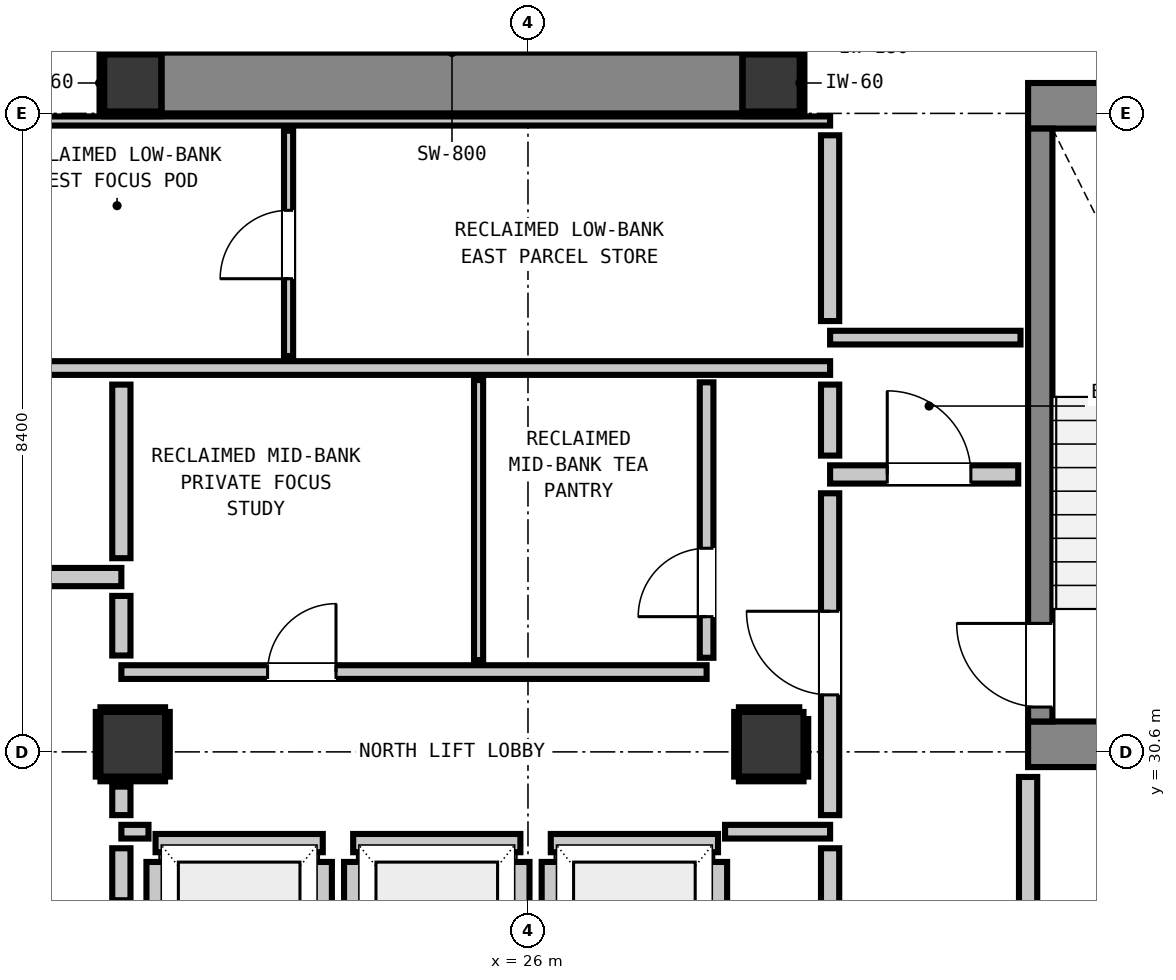
"""IFC4 building model, lengths in metres.
Left out: names, types, materials, properties, quantities, classifications, styles, units other than length and angle.
Written with IfcOpenShell. Run it as: python <this file> out.ifc"""

import sys

from ifc_helpers import new_model, si_unit, direction, frame, frame_2d, origin, origin_2d, place, context, subcontext, project, spatial, rectangle, extrude, element, fill, save


model = new_model("IFC4")
c1 = context("Model", 3, precision=1e-05, world=origin(), true_north=direction((0.0, 1.0)))
c2 = subcontext(c1, "Body", "Model", "MODEL_VIEW")
j1 = project(units=[si_unit("LENGTHUNIT", "METRE"), si_unit("PLANEANGLEUNIT", "RADIAN")], contexts=[c1])
p1 = place(None, origin())
s1 = spatial("IfcSite", under=j1, at=p1, CompositionType="ELEMENT")
p2 = place(p1, origin())
s2 = spatial("IfcBuilding", under=s1, at=p2, CompositionType="ELEMENT")
p3 = place(p2, frame((0.0, 0.0, 237.92)))
s3 = spatial("IfcBuildingStorey", under=s2, at=p3, CompositionType="ELEMENT", Elevation=237.92)
for number, where, z_axis, x_axis in (
    (1, (20.8, 39.4, 0.0), (0.0, 0.0, 1.0), (1.0, 0.0, 0.0)),
    (2, (29.2, 39.4, 0.0), (0.0, 0.0, 1.0), (1.0, 0.0, 0.0)),
):
    element("IfcColumn", number, at=place(p3, frame(where, z_axis=z_axis, x_axis=x_axis)), inside=s3, PredefinedType="COLUMN", context=c2, shape_type="SweptSolid", body=[
        extrude(rectangle(XDim=0.75, YDim=0.75, at=origin_2d()), origin(), (0.0, 0.0, 1.0), 3.32),
    ])
p4 = place(p3, frame((32.58, 39.1, 0.0), z_axis=(0.0, 0.0, 1.0), x_axis=(1.0, 0.0, 0.0)))
e3 = element("IfcWall", 3, at=p4, inside=s3, PredefinedType="SHEAR", context=c2, shape_type="SweptSolid", body=[
    extrude(rectangle(XDim=4.08, YDim=0.6, at=frame_2d((2.04, 0.0))), origin(), (0.0, 0.0, 1.0), 3.32),
])
p5 = place(p3, frame((32.58, 30.7, 0.0), z_axis=(0.0, 0.0, 1.0), x_axis=(1.0, 0.0, 0.0)))
e4 = element("IfcWall", 4, at=p5, inside=s3, PredefinedType="SHEAR", context=c2, shape_type="SweptSolid", body=[
    extrude(rectangle(XDim=3.54, YDim=0.6, at=frame_2d((1.77, 0.0))), origin(), (0.0, 0.0, 1.0), 3.32),
])
p6 = place(p3, frame((21.18, 39.4, 0.0), z_axis=(0.0, 0.0, 1.0), x_axis=(1.0, 0.0, 0.0)))
e5 = element("IfcWall", 5, at=p6, inside=s3, PredefinedType="SHEAR", context=c2, shape_type="SweptSolid", body=[
    extrude(rectangle(XDim=7.64, YDim=0.8, at=frame_2d((3.82, 0.0))), origin(), (0.0, 0.0, 1.0), 3.32),
])
p7 = place(p3, frame((32.74, 31.0, 0.0), z_axis=(0.0, 0.0, 1.0), x_axis=(0.0, 1.0, 0.0)))
e6 = element("IfcWall", 6, at=p7, inside=s3, PredefinedType="SHEAR", context=c2, shape_type="SweptSolid", body=[
    extrude(rectangle(XDim=7.8, YDim=0.32, at=frame_2d((3.9, 0.0))), origin(), (0.0, 0.0, 1.0), 3.32),
])
p8 = place(p7, frame((0.19, 0.0, 0.0)))
e7 = element("IfcOpeningElement", 7, at=p8, cuts=e6, PredefinedType="OPENING", context=c2, shape_type="SweptSolid", body=[
    extrude(rectangle(XDim=1.1, YDim=2.15, at=frame_2d((0.55, 1.075))), frame((0.0, 0.17, 0.0), z_axis=(0.0, -1.0, 0.0), x_axis=(1.0, 0.0, 0.0)), (0.0, 0.0, 1.0), 0.34),
])
for number, where, z_axis, x_axis in (
    (8, (20.8, 30.7, 0.0), (0.0, 0.0, 1.0), (1.0, 0.0, 0.0)),
    (9, (29.2, 30.7, 0.0), (0.0, 0.0, 1.0), (1.0, 0.0, 0.0)),
):
    element("IfcColumn", number, at=place(p3, frame(where, z_axis=z_axis, x_axis=x_axis)), inside=s3, PredefinedType="COLUMN", context=c2, shape_type="SweptSolid", body=[
        extrude(rectangle(XDim=0.85, YDim=0.85, at=origin_2d()), origin(), (0.0, 0.0, 1.0), 3.32),
    ])
p9 = place(p3, frame((21.1, 29.4, 0.0), z_axis=(0.0, 0.0, 1.0), x_axis=(1.0, 0.0, 0.0)))
e10 = element("IfcWall", 10, at=p9, inside=s3, PredefinedType="PARTITIONING", context=c2, shape_type="SweptSolid", body=[
    extrude(rectangle(XDim=2.2, YDim=0.24, at=frame_2d((1.1, 0.0))), origin(), (0.0, 0.0, 1.0), 3.1),
])
p10 = place(p3, frame((21.1, 27.048, 0.0), z_axis=(0.0, 0.0, 1.0), x_axis=(0.0, 1.0, 0.0)))
e11 = element("IfcWall", 11, at=p10, inside=s3, PredefinedType="PARTITIONING", context=c2, shape_type="SweptSolid", body=[
    extrude(rectangle(XDim=2.104, YDim=0.24, at=frame_2d((1.052, 0.0))), origin(), (0.0, 0.0, 1.0), 2.335),
])
p11 = place(p3, frame((23.3, 27.048, 0.0), z_axis=(0.0, 0.0, 1.0), x_axis=(0.0, 1.0, 0.0)))
e12 = element("IfcWall", 12, at=p11, inside=s3, PredefinedType="PARTITIONING", context=c2, shape_type="SweptSolid", body=[
    extrude(rectangle(XDim=2.104, YDim=0.24, at=frame_2d((1.052, 0.0))), origin(), (0.0, 0.0, 1.0), 3.1),
])
p12 = place(p3, frame((23.7, 29.4, 0.0), z_axis=(0.0, 0.0, 1.0), x_axis=(1.0, 0.0, 0.0)))
e13 = element("IfcWall", 13, at=p12, inside=s3, PredefinedType="PARTITIONING", context=c2, shape_type="SweptSolid", body=[
    extrude(rectangle(XDim=2.2, YDim=0.24, at=frame_2d((1.1, 0.0))), origin(), (0.0, 0.0, 1.0), 3.1),
])
for number, where, z_axis, x_axis in (
    (14, (23.7, 27.048, 0.0), (0.0, 0.0, 1.0), (0.0, 1.0, 0.0)),
    (15, (25.9, 27.048, 0.0), (0.0, 0.0, 1.0), (0.0, 1.0, 0.0)),
):
    element("IfcWall", number, at=place(p3, frame(where, z_axis=z_axis, x_axis=x_axis)), inside=s3, PredefinedType="PARTITIONING", context=c2, shape_type="SweptSolid", body=[
        extrude(rectangle(XDim=2.104, YDim=0.24, at=frame_2d((1.052, 0.0))), origin(), (0.0, 0.0, 1.0), 3.1),
    ])
p13 = place(p3, frame((26.3, 29.4, 0.0), z_axis=(0.0, 0.0, 1.0), x_axis=(1.0, 0.0, 0.0)))
e16 = element("IfcWall", 16, at=p13, inside=s3, PredefinedType="PARTITIONING", context=c2, shape_type="SweptSolid", body=[
    extrude(rectangle(XDim=2.2, YDim=0.24, at=frame_2d((1.1, 0.0))), origin(), (0.0, 0.0, 1.0), 3.1),
])
p14 = place(p3, frame((26.3, 27.048, 0.0), z_axis=(0.0, 0.0, 1.0), x_axis=(0.0, 1.0, 0.0)))
e17 = element("IfcWall", 17, at=p14, inside=s3, PredefinedType="PARTITIONING", context=c2, shape_type="SweptSolid", body=[
    extrude(rectangle(XDim=2.104, YDim=0.24, at=frame_2d((1.052, 0.0))), origin(), (0.0, 0.0, 1.0), 3.1),
])
p15 = place(p3, frame((28.5, 27.33, 0.0), z_axis=(0.0, 0.0, 1.0), x_axis=(0.0, 1.0, 0.0)))
e18 = element("IfcWall", 18, at=p15, inside=s3, PredefinedType="PARTITIONING", context=c2, shape_type="SweptSolid", body=[
    extrude(rectangle(XDim=1.822, YDim=0.24, at=frame_2d((0.911, 0.0))), origin(), (0.0, 0.0, 1.0), 3.1),
])
p16 = place(p3, frame((17.45, 32.9, 0.0), z_axis=(0.0, 0.0, 1.0), x_axis=(1.0, 0.0, 0.0)))
e19 = element("IfcWall", 19, at=p16, inside=s3, PredefinedType="PARTITIONING", context=c2, shape_type="SweptSolid", body=[
    extrude(rectangle(XDim=3.2, YDim=0.24, at=frame_2d((1.6, 0.0))), origin(), (0.0, 0.0, 1.0), 3.1),
])
p17 = place(p16, frame((0.159, 0.0, 0.0)))
e20 = element("IfcOpeningElement", 20, at=p17, cuts=e19, PredefinedType="OPENING", context=c2, shape_type="SweptSolid", body=[
    extrude(rectangle(XDim=1.1, YDim=2.15, at=frame_2d((0.55, 1.075))), frame((0.0, 0.13, 0.0), z_axis=(0.0, -1.0, 0.0), x_axis=(1.0, 0.0, 0.0)), (0.0, 0.0, 1.0), 0.26),
])
p18 = place(p3, frame((29.975, 34.25, 0.0), z_axis=(0.0, 0.0, 1.0), x_axis=(1.0, 0.0, 0.0)))
e21 = element("IfcWall", 21, at=p18, inside=s3, PredefinedType="PARTITIONING", context=c2, shape_type="SweptSolid", body=[
    extrude(rectangle(XDim=2.475, YDim=0.24, at=frame_2d((1.237, 0.0))), origin(), (0.0, 0.0, 1.0), 3.1),
])
p19 = place(p18, frame((0.752, 0.0, 0.0)))
e22 = element("IfcOpeningElement", 22, at=p19, cuts=e21, PredefinedType="OPENING", context=c2, shape_type="SweptSolid", body=[
    extrude(rectangle(XDim=1.1, YDim=2.15, at=frame_2d((0.55, 1.075))), frame((0.0, 0.13, 0.0), z_axis=(0.0, -1.0, 0.0), x_axis=(1.0, 0.0, 0.0)), (0.0, 0.0, 1.0), 0.26),
])
p20 = place(p3, frame((20.65, 29.55, 0.0), z_axis=(0.0, 0.0, 1.0), x_axis=(1.0, 0.0, 0.0)))
e23 = element("IfcWall", 23, at=p20, inside=s3, PredefinedType="PARTITIONING", context=c2, shape_type="SweptSolid", body=[
    extrude(rectangle(XDim=0.357, YDim=0.18, at=frame_2d((0.179, 0.0))), origin(), (0.0, 0.0, 1.0), 3.1),
])
p21 = place(p3, frame((28.593, 29.55, 0.0), z_axis=(0.0, 0.0, 1.0), x_axis=(1.0, 0.0, 0.0)))
e24 = element("IfcWall", 24, at=p21, inside=s3, PredefinedType="PARTITIONING", context=c2, shape_type="SweptSolid", body=[
    extrude(rectangle(XDim=1.382, YDim=0.18, at=frame_2d((0.691, 0.0))), origin(), (0.0, 0.0, 1.0), 3.1),
])
p22 = place(p3, frame((20.65, 31.65, 0.0), z_axis=(0.0, 0.0, 1.0), x_axis=(1.0, 0.0, 0.0)))
e25 = element("IfcWall", 25, at=p22, inside=s3, PredefinedType="PARTITIONING", context=c2, shape_type="SweptSolid", body=[
    extrude(rectangle(XDim=7.7, YDim=0.18, at=frame_2d((3.85, 0.0))), origin(), (0.0, 0.0, 1.0), 3.1),
])
p23 = place(p22, frame((1.924, 0.0, 0.0)))
e26 = element("IfcOpeningElement", 26, at=p23, cuts=e25, PredefinedType="OPENING", context=c2, shape_type="SweptSolid", body=[
    extrude(rectangle(XDim=0.9, YDim=2.1, at=frame_2d((0.45, 1.05))), frame((0.0, 0.1, 0.0), z_axis=(0.0, -1.0, 0.0), x_axis=(1.0, 0.0, 0.0)), (0.0, 0.0, 1.0), 0.2),
])
p24 = place(p3, frame((18.95, 35.65, 0.0), z_axis=(0.0, 0.0, 1.0), x_axis=(1.0, 0.0, 0.0)))
e27 = element("IfcWall", 27, at=p24, inside=s3, PredefinedType="PARTITIONING", context=c2, shape_type="SweptSolid", body=[
    extrude(rectangle(XDim=11.025, YDim=0.18, at=frame_2d((5.513, 0.0))), origin(), (0.0, 0.0, 1.0), 3.1),
])
p25 = place(p3, frame((29.975, 36.05, 0.0), z_axis=(0.0, 0.0, 1.0), x_axis=(1.0, 0.0, 0.0)))
e28 = element("IfcWall", 28, at=p25, inside=s3, PredefinedType="PARTITIONING", context=c2, shape_type="SweptSolid", body=[
    extrude(rectangle(XDim=2.505, YDim=0.18, at=frame_2d((1.252, 0.0))), origin(), (0.0, 0.0, 1.0), 3.1),
])
p26 = place(p3, frame((18.95, 38.9, 0.0), z_axis=(0.0, 0.0, 1.0), x_axis=(1.0, 0.0, 0.0)))
e29 = element("IfcWall", 29, at=p26, inside=s3, PredefinedType="PARTITIONING", context=c2, shape_type="SweptSolid", body=[
    extrude(rectangle(XDim=11.025, YDim=0.12, at=frame_2d((5.513, 0.0))), origin(), (0.0, 0.0, 1.0), 3.1),
])
p27 = place(p3, frame((20.65, 28.648, 0.0), z_axis=(0.0, 0.0, 1.0), x_axis=(0.0, 1.0, 0.0)))
e30 = element("IfcWall", 30, at=p27, inside=s3, PredefinedType="PARTITIONING", context=c2, shape_type="SweptSolid", body=[
    extrude(rectangle(XDim=0.684, YDim=0.24, at=frame_2d((0.342, 0.0))), origin(), (0.0, 0.0, 1.0), 2.335),
])
p28 = place(p3, frame((20.65, 29.768, 0.0), z_axis=(0.0, 0.0, 1.0), x_axis=(0.0, 1.0, 0.0)))
e31 = element("IfcWall", 31, at=p28, inside=s3, PredefinedType="PARTITIONING", context=c2, shape_type="SweptSolid", body=[
    extrude(rectangle(XDim=0.375, YDim=0.24, at=frame_2d((0.188, 0.0))), origin(), (0.0, 0.0, 1.0), 2.335),
])
p29 = place(p3, frame((20.65, 31.868, 0.0), z_axis=(0.0, 0.0, 1.0), x_axis=(0.0, 1.0, 0.0)))
e32 = element("IfcWall", 32, at=p29, inside=s3, PredefinedType="PARTITIONING", context=c2, shape_type="SweptSolid", body=[
    extrude(rectangle(XDim=0.784, YDim=0.24, at=frame_2d((0.392, 0.0))), origin(), (0.0, 0.0, 1.0), 2.335),
])
p30 = place(p3, frame((20.65, 33.148, 0.0), z_axis=(0.0, 0.0, 1.0), x_axis=(0.0, 1.0, 0.0)))
e33 = element("IfcWall", 33, at=p30, inside=s3, PredefinedType="PARTITIONING", context=c2, shape_type="SweptSolid", body=[
    extrude(rectangle(XDim=2.284, YDim=0.24, at=frame_2d((1.142, 0.0))), origin(), (0.0, 0.0, 1.0), 2.335),
])
p31 = place(p3, frame((29.975, 25.648, 0.0), z_axis=(0.0, 0.0, 1.0), x_axis=(0.0, 1.0, 0.0)))
e34 = element("IfcWall", 34, at=p31, inside=s3, PredefinedType="PARTITIONING", context=c2, shape_type="SweptSolid", body=[
    extrude(rectangle(XDim=3.684, YDim=0.24, at=frame_2d((1.842, 0.0))), origin(), (0.0, 0.0, 1.0), 3.1),
])
p32 = place(p3, frame((29.975, 29.768, 0.0), z_axis=(0.0, 0.0, 1.0), x_axis=(0.0, 1.0, 0.0)))
e35 = element("IfcWall", 35, at=p32, inside=s3, PredefinedType="PARTITIONING", context=c2, shape_type="SweptSolid", body=[
    extrude(rectangle(XDim=4.234, YDim=0.24, at=frame_2d((2.117, 0.0))), origin(), (0.0, 0.0, 1.0), 3.1),
])
p33 = place(p32, frame((1.582, 0.0, 0.0)))
e36 = element("IfcOpeningElement", 36, at=p33, cuts=e35, PredefinedType="OPENING", context=c2, shape_type="SweptSolid", body=[
    extrude(rectangle(XDim=1.1, YDim=2.15, at=frame_2d((0.55, 1.075))), frame((0.0, 0.13, 0.0), z_axis=(0.0, -1.0, 0.0), x_axis=(1.0, 0.0, 0.0)), (0.0, 0.0, 1.0), 0.26),
])
p34 = place(p3, frame((29.975, 34.498, 0.0), z_axis=(0.0, 0.0, 1.0), x_axis=(0.0, 1.0, 0.0)))
e37 = element("IfcWall", 37, at=p34, inside=s3, PredefinedType="PARTITIONING", context=c2, shape_type="SweptSolid", body=[
    extrude(rectangle(XDim=0.934, YDim=0.24, at=frame_2d((0.467, 0.0))), origin(), (0.0, 0.0, 1.0), 3.1),
])
p35 = place(p3, frame((29.975, 36.268, 0.0), z_axis=(0.0, 0.0, 1.0), x_axis=(0.0, 1.0, 0.0)))
e38 = element("IfcWall", 38, at=p35, inside=s3, PredefinedType="PARTITIONING", context=c2, shape_type="SweptSolid", body=[
    extrude(rectangle(XDim=2.444, YDim=0.24, at=frame_2d((1.222, 0.0))), origin(), (0.0, 0.0, 1.0), 3.1),
])
p36 = place(p3, frame((32.58, 25.648, 0.0), z_axis=(0.0, 0.0, 1.0), x_axis=(0.0, 1.0, 0.0)))
e39 = element("IfcWall", 39, at=p36, inside=s3, PredefinedType="PARTITIONING", context=c2, shape_type="SweptSolid", body=[
    extrude(rectangle(XDim=4.622, YDim=0.24, at=frame_2d((2.311, 0.0))), origin(), (0.0, 0.0, 1.0), 3.1),
])
p37 = place(p3, frame((28.35, 31.838, 0.0), z_axis=(0.0, 0.0, 1.0), x_axis=(0.0, 1.0, 0.0)))
e40 = element("IfcWall", 40, at=p37, inside=s3, PredefinedType="PARTITIONING", context=c2, shape_type="SweptSolid", body=[
    extrude(rectangle(XDim=3.624, YDim=0.18, at=frame_2d((1.812, 0.0))), origin(), (0.0, 0.0, 1.0), 3.1),
])
p38 = place(p37, frame((0.541, 0.0, 0.0)))
e41 = element("IfcOpeningElement", 41, at=p38, cuts=e40, PredefinedType="OPENING", context=c2, shape_type="SweptSolid", body=[
    extrude(rectangle(XDim=0.9, YDim=2.1, at=frame_2d((0.45, 1.05))), frame((0.0, 0.1, 0.0), z_axis=(0.0, -1.0, 0.0), x_axis=(1.0, 0.0, 0.0)), (0.0, 0.0, 1.0), 0.2),
])
p39 = place(p3, frame((22.85, 35.808, 0.0), z_axis=(0.0, 0.0, 1.0), x_axis=(0.0, 1.0, 0.0)))
e42 = element("IfcWall", 42, at=p39, inside=s3, PredefinedType="PARTITIONING", context=c2, shape_type="SweptSolid", body=[
    extrude(rectangle(XDim=2.964, YDim=0.12, at=frame_2d((1.482, 0.0))), origin(), (0.0, 0.0, 1.0), 3.1),
])
p40 = place(p39, frame((1.017, 0.0, 0.0)))
e43 = element("IfcOpeningElement", 43, at=p40, cuts=e42, PredefinedType="OPENING", context=c2, shape_type="SweptSolid", body=[
    extrude(rectangle(XDim=0.9, YDim=2.1, at=frame_2d((0.45, 1.05))), frame((0.0, 0.07, 0.0), z_axis=(0.0, -1.0, 0.0), x_axis=(1.0, 0.0, 0.0)), (0.0, 0.0, 1.0), 0.14),
])
p41 = place(p3, frame((25.35, 31.808, 0.0), z_axis=(0.0, 0.0, 1.0), x_axis=(0.0, 1.0, 0.0)))
e44 = element("IfcWall", 44, at=p41, inside=s3, PredefinedType="PARTITIONING", context=c2, shape_type="SweptSolid", body=[
    extrude(rectangle(XDim=3.684, YDim=0.12, at=frame_2d((1.842, 0.0))), origin(), (0.0, 0.0, 1.0), 3.1),
])
for number, where, z_axis, x_axis in (
    (45, (20.425, 38.993, 0.0), (0.0, 0.0, 1.0), (1.0, 0.0, 0.0)),
    (46, (20.425, 39.807, 0.0), (0.0, 0.0, 1.0), (1.0, 0.0, 0.0)),
):
    element("IfcWall", number, at=place(p3, frame(where, z_axis=z_axis, x_axis=x_axis)), inside=s3, PredefinedType="PARTITIONING", context=c2, shape_type="SweptSolid", body=[
        extrude(rectangle(XDim=0.742, YDim=0.06, at=frame_2d((0.371, 0.0))), origin(), (0.0, 0.0, 1.0), 1.45),
    ])
p42 = place(p3, frame((20.393, 39.025, 0.0), z_axis=(0.0, 0.0, 1.0), x_axis=(0.0, 1.0, 0.0)))
e47 = element("IfcWall", 47, at=p42, inside=s3, PredefinedType="PARTITIONING", context=c2, shape_type="SweptSolid", body=[
    extrude(rectangle(XDim=0.75, YDim=0.06, at=frame_2d((0.375, 0.0))), origin(), (0.0, 0.0, 1.0), 1.45),
])
for number, where, z_axis, x_axis in (
    (48, (28.833, 38.993, 0.0), (0.0, 0.0, 1.0), (1.0, 0.0, 0.0)),
    (49, (28.833, 39.807, 0.0), (0.0, 0.0, 1.0), (1.0, 0.0, 0.0)),
):
    element("IfcWall", number, at=place(p3, frame(where, z_axis=z_axis, x_axis=x_axis)), inside=s3, PredefinedType="PARTITIONING", context=c2, shape_type="SweptSolid", body=[
        extrude(rectangle(XDim=0.742, YDim=0.06, at=frame_2d((0.371, 0.0))), origin(), (0.0, 0.0, 1.0), 1.45),
    ])
p43 = place(p3, frame((29.607, 39.025, 0.0), z_axis=(0.0, 0.0, 1.0), x_axis=(0.0, 1.0, 0.0)))
e50 = element("IfcWall", 50, at=p43, inside=s3, PredefinedType="PARTITIONING", context=c2, shape_type="SweptSolid", body=[
    extrude(rectangle(XDim=0.75, YDim=0.06, at=frame_2d((0.375, 0.0))), origin(), (0.0, 0.0, 1.0), 1.45),
])
for number, where, z_axis, x_axis in (
    (51, (20.375, 30.243, 0.0), (0.0, 0.0, 1.0), (1.0, 0.0, 0.0)),
    (52, (20.375, 31.157, 0.0), (0.0, 0.0, 1.0), (1.0, 0.0, 0.0)),
    (53, (20.343, 30.275, 0.0), (0.0, 0.0, 1.0), (0.0, 1.0, 0.0)),
    (54, (21.257, 30.275, 0.0), (0.0, 0.0, 1.0), (0.0, 1.0, 0.0)),
    (55, (28.775, 30.243, 0.0), (0.0, 0.0, 1.0), (1.0, 0.0, 0.0)),
):
    element("IfcWall", number, at=place(p3, frame(where, z_axis=z_axis, x_axis=x_axis)), inside=s3, PredefinedType="PARTITIONING", context=c2, shape_type="SweptSolid", body=[
        extrude(rectangle(XDim=0.85, YDim=0.06, at=frame_2d((0.425, 0.0))), origin(), (0.0, 0.0, 1.0), 1.45),
    ])
p44 = place(p3, frame((28.775, 31.157, 0.0), z_axis=(0.0, 0.0, 1.0), x_axis=(1.0, 0.0, 0.0)))
e56 = element("IfcWall", 56, at=p44, inside=s3, PredefinedType="PARTITIONING", context=c2, shape_type="SweptSolid", body=[
    extrude(rectangle(XDim=0.794, YDim=0.06, at=frame_2d((0.397, 0.0))), origin(), (0.0, 0.0, 1.0), 1.45),
])
p45 = place(p3, frame((28.743, 30.275, 0.0), z_axis=(0.0, 0.0, 1.0), x_axis=(0.0, 1.0, 0.0)))
e57 = element("IfcWall", 57, at=p45, inside=s3, PredefinedType="PARTITIONING", context=c2, shape_type="SweptSolid", body=[
    extrude(rectangle(XDim=0.85, YDim=0.06, at=frame_2d((0.425, 0.0))), origin(), (0.0, 0.0, 1.0), 1.45),
])
p46 = place(p3, frame((29.657, 30.275, 0.0), z_axis=(0.0, 0.0, 1.0), x_axis=(0.0, 1.0, 0.0)))
e58 = element("IfcWall", 58, at=p46, inside=s3, PredefinedType="PARTITIONING", context=c2, shape_type="SweptSolid", body=[
    extrude(rectangle(XDim=0.757, YDim=0.06, at=frame_2d((0.378, 0.0))), origin(), (0.0, 0.0, 1.0), 1.45),
])
p47 = place(p8, origin())
e59 = element("IfcDoor", 59, at=p47, inside=s3, OperationType="SINGLE_SWING_RIGHT", PredefinedType="DOOR", context=c2, shape_type="SweptSolid", body=[
    extrude(rectangle(XDim=1.1, YDim=2.15, at=frame_2d((0.55, 1.075))), frame((0.0, 0.025, 0.0), z_axis=(0.0, -1.0, 0.0), x_axis=(1.0, 0.0, 0.0)), (0.0, 0.0, 1.0), 0.05),
])
fill(e7, e59)
p48 = place(p33, origin())
e60 = element("IfcDoor", 60, at=p48, inside=s3, OperationType="SINGLE_SWING_RIGHT", PredefinedType="DOOR", context=c2, shape_type="SweptSolid", body=[
    extrude(rectangle(XDim=1.1, YDim=2.15, at=frame_2d((0.55, 1.075))), frame((0.0, 0.025, 0.0), z_axis=(0.0, -1.0, 0.0), x_axis=(1.0, 0.0, 0.0)), (0.0, 0.0, 1.0), 0.05),
])
fill(e36, e60)
p49 = place(p19, origin())
e61 = element("IfcDoor", 61, at=p49, inside=s3, OperationType="SINGLE_SWING_LEFT", PredefinedType="DOOR", context=c2, shape_type="SweptSolid", body=[
    extrude(rectangle(XDim=1.1, YDim=2.15, at=frame_2d((0.55, 1.075))), frame((0.0, 0.025, 0.0), z_axis=(0.0, -1.0, 0.0), x_axis=(1.0, 0.0, 0.0)), (0.0, 0.0, 1.0), 0.05),
])
fill(e22, e61)
p50 = place(p40, origin())
e62 = element("IfcDoor", 62, at=p50, inside=s3, OperationType="SINGLE_SWING_LEFT", PredefinedType="DOOR", context=c2, shape_type="SweptSolid", body=[
    extrude(rectangle(XDim=0.9, YDim=2.1, at=frame_2d((0.45, 1.05))), frame((0.0, 0.025, 0.0), z_axis=(0.0, -1.0, 0.0), x_axis=(1.0, 0.0, 0.0)), (0.0, 0.0, 1.0), 0.05),
])
fill(e43, e62)
p51 = place(p23, origin())
e63 = element("IfcDoor", 63, at=p51, inside=s3, OperationType="SINGLE_SWING_RIGHT", PredefinedType="DOOR", context=c2, shape_type="SweptSolid", body=[
    extrude(rectangle(XDim=0.9, YDim=2.1, at=frame_2d((0.45, 1.05))), frame((0.0, 0.025, 0.0), z_axis=(0.0, -1.0, 0.0), x_axis=(1.0, 0.0, 0.0)), (0.0, 0.0, 1.0), 0.05),
])
fill(e26, e63)
p52 = place(p38, origin())
e64 = element("IfcDoor", 64, at=p52, inside=s3, OperationType="SINGLE_SWING_LEFT", PredefinedType="DOOR", context=c2, shape_type="SweptSolid", body=[
    extrude(rectangle(XDim=0.9, YDim=2.1, at=frame_2d((0.45, 1.05))), frame((0.0, 0.025, 0.0), z_axis=(0.0, -1.0, 0.0), x_axis=(1.0, 0.0, 0.0)), (0.0, 0.0, 1.0), 0.05),
])
fill(e41, e64)
save(model, sys.argv[1])
